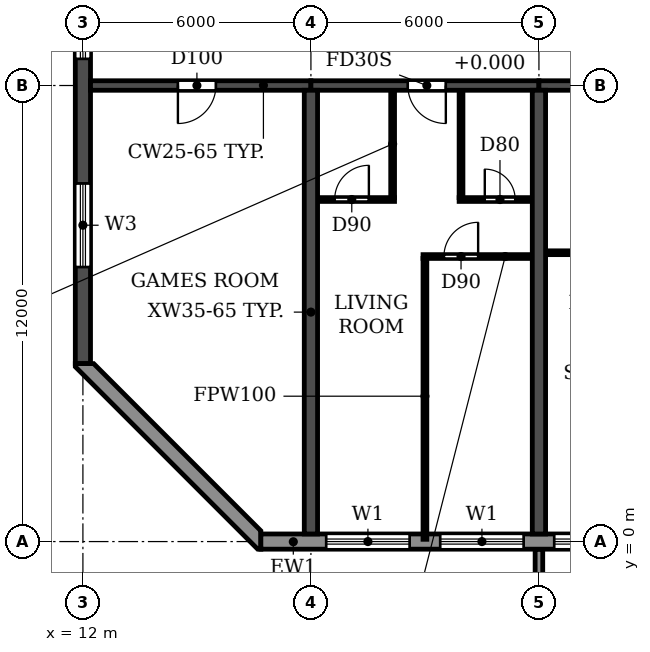
"""IFC4 building model, lengths in metres.
Left out: names, types, materials, properties, quantities, classifications, styles, units other than length and angle.
Written with IfcOpenShell. Run it as: python <this file> out.ifc"""

import sys

from ifc_helpers import new_model, si_unit, direction, frame, frame_2d, origin, place, context, subcontext, project, spatial, polyline, rectangle, outline, extrude, source, transform, mapped, element, fill, save


model = new_model("IFC4")
c1 = context("Model", 3, precision=1e-05, world=origin(), true_north=direction((0.0, 1.0)))
c2 = subcontext(c1, "Body", "Model", "MODEL_VIEW")
j1 = project(units=[si_unit("LENGTHUNIT", "METRE"), si_unit("PLANEANGLEUNIT", "RADIAN")], contexts=[c1])
p1 = place(None, origin())
s1 = spatial("IfcSite", under=j1, at=p1, CompositionType="ELEMENT")
p2 = place(p1, origin())
s2 = spatial("IfcBuilding", under=s1, at=p2, CompositionType="ELEMENT")
p3 = place(p2, frame((0.0, 0.0, 109.2)))
s3 = spatial("IfcBuildingStorey", under=s2, at=p3, CompositionType="ELEMENT", Elevation=109.2)
for number, where, z_axis, x_axis in (
    (1, (18.0, 0.2, 0.0), (0.0, 0.0, 1.0), (0.0, 1.0, 0.0)),
    (2, (24.0, 0.2, 0.0), (0.0, 0.0, 1.0), (0.0, 1.0, 0.0)),
):
    element("IfcWall", number, at=place(p3, frame(where, z_axis=z_axis, x_axis=x_axis)), inside=s3, PredefinedType="SHEAR", context=c2, shape_type="SweptSolid", body=[
        extrude(rectangle(XDim=11.675, YDim=0.35, at=frame_2d((5.837, 0.0))), origin(), (0.0, 0.0, 1.0), 3.06),
    ])
p4 = place(p3, frame((12.0, 4.683, 0.0), z_axis=(0.0, 0.0, 1.0), x_axis=(0.0, 1.0, 0.0)))
e3 = element("IfcWall", 3, at=p4, inside=s3, PredefinedType="SHEAR", context=c2, shape_type="SweptSolid", body=[
    extrude(rectangle(XDim=34.234, YDim=0.4, at=frame_2d((17.117, 0.0))), origin(), (0.0, 0.0, 1.0), 3.06),
])
p5 = place(p4, frame((23.817, 0.0, 0.9)))
e4 = element("IfcOpeningElement", 4, at=p5, cuts=e3, PredefinedType="OPENING", context=c2, shape_type="SweptSolid", body=[
    extrude(rectangle(XDim=1.2, YDim=1.5, at=frame_2d((0.6, 0.75))), frame((0.0, 0.21, 0.0), z_axis=(0.0, -1.0, 0.0), x_axis=(1.0, 0.0, 0.0)), (0.0, 0.0, 1.0), 0.42),
])
p6 = place(p4, frame((8.017, 0.0, 0.9)))
e5 = element("IfcOpeningElement", 5, at=p6, cuts=e3, PredefinedType="OPENING", context=c2, shape_type="SweptSolid", body=[
    extrude(rectangle(XDim=1.2, YDim=1.5, at=frame_2d((0.6, 0.75))), frame((0.0, 0.21, 0.0), z_axis=(0.0, -1.0, 0.0), x_axis=(1.0, 0.0, 0.0)), (0.0, 0.0, 1.0), 0.42),
])
p7 = place(p4, frame((15.917, 0.0, 0.9)))
e6 = element("IfcOpeningElement", 6, at=p7, cuts=e3, PredefinedType="OPENING", context=c2, shape_type="SweptSolid", body=[
    extrude(rectangle(XDim=1.2, YDim=1.5, at=frame_2d((0.6, 0.75))), frame((0.0, 0.21, 0.0), z_axis=(0.0, -1.0, 0.0), x_axis=(1.0, 0.0, 0.0)), (0.0, 0.0, 1.0), 0.42),
])
p8 = place(p4, frame((28.894, 0.0, 0.6)))
e7 = element("IfcOpeningElement", 7, at=p8, cuts=e3, PredefinedType="OPENING", context=c2, shape_type="SweptSolid", body=[
    extrude(rectangle(XDim=2.2, YDim=1.8, at=frame_2d((1.1, 0.9))), frame((0.0, 0.21, 0.0), z_axis=(0.0, -1.0, 0.0), x_axis=(1.0, 0.0, 0.0)), (0.0, 0.0, 1.0), 0.42),
])
p9 = place(p4, frame((2.541, 0.0, 0.6)))
e8 = element("IfcOpeningElement", 8, at=p9, cuts=e3, PredefinedType="OPENING", context=c2, shape_type="SweptSolid", body=[
    extrude(rectangle(XDim=2.2, YDim=1.8, at=frame_2d((1.1, 0.9))), frame((0.0, 0.21, 0.0), z_axis=(0.0, -1.0, 0.0), x_axis=(1.0, 0.0, 0.0)), (0.0, 0.0, 1.0), 0.42),
])
p10 = place(p3, frame((12.2, 12.0, 0.0), z_axis=(0.0, 0.0, 1.0), x_axis=(1.0, 0.0, 0.0)))
e9 = element("IfcWall", 9, at=p10, inside=s3, PredefinedType="SHEAR", context=c2, shape_type="SweptSolid", body=[
    extrude(rectangle(XDim=5.8, YDim=0.25, at=frame_2d((2.9, 0.0))), origin(), (0.0, 0.0, 1.0), 2.46),
])
p11 = place(p10, frame((2.3, 0.0, 0.0)))
e10 = element("IfcOpeningElement", 10, at=p11, cuts=e9, PredefinedType="OPENING", context=c2, shape_type="SweptSolid", body=[
    extrude(rectangle(XDim=1.0, YDim=2.1, at=frame_2d((0.5, 1.05))), frame((0.0, 0.135, 0.0), z_axis=(0.0, -1.0, 0.0), x_axis=(1.0, 0.0, 0.0)), (0.0, 0.0, 1.0), 0.27),
])
p12 = place(p3, frame((18.0, 12.0, 0.0), z_axis=(0.0, 0.0, 1.0), x_axis=(1.0, 0.0, 0.0)))
e11 = element("IfcWall", 11, at=p12, inside=s3, PredefinedType="SHEAR", context=c2, shape_type="SweptSolid", body=[
    extrude(rectangle(XDim=6.0, YDim=0.25, at=frame_2d((3.0, 0.0))), origin(), (0.0, 0.0, 1.0), 2.46),
])
p13 = place(p12, frame((2.55, 0.0, 0.0)))
e12 = element("IfcOpeningElement", 12, at=p13, cuts=e11, PredefinedType="OPENING", context=c2, shape_type="SweptSolid", body=[
    extrude(rectangle(XDim=1.0, YDim=2.1, at=frame_2d((0.5, 1.05))), frame((0.0, 0.135, 0.0), z_axis=(0.0, -1.0, 0.0), x_axis=(1.0, 0.0, 0.0)), (0.0, 0.0, 1.0), 0.27),
])
p14 = place(p3, frame((24.0, 12.0, 0.0), z_axis=(0.0, 0.0, 1.0), x_axis=(1.0, 0.0, 0.0)))
e13 = element("IfcWall", 13, at=p14, inside=s3, PredefinedType="SHEAR", context=c2, shape_type="SweptSolid", body=[
    extrude(rectangle(XDim=6.0, YDim=0.25, at=frame_2d((3.0, 0.0))), origin(), (0.0, 0.0, 1.0), 2.46),
])
p15 = place(p14, frame((2.45, 0.0, 0.0)))
e14 = element("IfcOpeningElement", 14, at=p15, cuts=e13, PredefinedType="OPENING", context=c2, shape_type="SweptSolid", body=[
    extrude(rectangle(XDim=1.0, YDim=2.1, at=frame_2d((0.5, 1.05))), frame((0.0, 0.135, 0.0), z_axis=(0.0, -1.0, 0.0), x_axis=(1.0, 0.0, 0.0)), (0.0, 0.0, 1.0), 0.27),
])
p16 = place(p3, frame((16.683, 0.0, 0.0), z_axis=(0.0, 0.0, 1.0), x_axis=(1.0, 0.0, 0.0)))
e15 = element("IfcWall", 15, at=p16, inside=s3, PredefinedType="STANDARD", context=c2, shape_type="SweptSolid", body=[
    extrude(rectangle(XDim=68.634, YDim=0.4, at=frame_2d((34.317, 0.0))), origin(), (0.0, 0.0, 1.0), 3.06),
])
p17 = place(p16, frame((1.717, 0.0, 0.9)))
e16 = element("IfcOpeningElement", 16, at=p17, cuts=e15, PredefinedType="OPENING", context=c2, shape_type="SweptSolid", body=[
    extrude(rectangle(XDim=2.2, YDim=1.5, at=frame_2d((1.1, 0.75))), frame((0.0, 0.21, 0.0), z_axis=(0.0, -1.0, 0.0), x_axis=(1.0, 0.0, 0.0)), (0.0, 0.0, 1.0), 0.42),
])
p18 = place(p16, frame((4.717, 0.0, 0.9)))
e17 = element("IfcOpeningElement", 17, at=p18, cuts=e15, PredefinedType="OPENING", context=c2, shape_type="SweptSolid", body=[
    extrude(rectangle(XDim=2.2, YDim=1.5, at=frame_2d((1.1, 0.75))), frame((0.0, 0.21, 0.0), z_axis=(0.0, -1.0, 0.0), x_axis=(1.0, 0.0, 0.0)), (0.0, 0.0, 1.0), 0.42),
])
p19 = place(p16, frame((7.717, 0.0, 0.9)))
e18 = element("IfcOpeningElement", 18, at=p19, cuts=e15, PredefinedType="OPENING", context=c2, shape_type="SweptSolid", body=[
    extrude(rectangle(XDim=2.2, YDim=1.5, at=frame_2d((1.1, 0.75))), frame((0.0, 0.21, 0.0), z_axis=(0.0, -1.0, 0.0), x_axis=(1.0, 0.0, 0.0)), (0.0, 0.0, 1.0), 0.42),
])
p20 = place(p16, frame((10.917, 0.0, 0.0)))
e19 = element("IfcOpeningElement", 19, at=p20, cuts=e15, PredefinedType="OPENING", context=c2, shape_type="SweptSolid", body=[
    extrude(rectangle(XDim=1.8, YDim=2.4, at=frame_2d((0.9, 1.2))), frame((0.0, 0.21, 0.0), z_axis=(0.0, -1.0, 0.0), x_axis=(1.0, 0.0, 0.0)), (0.0, 0.0, 1.0), 0.42),
])
p21 = place(p16, frame((13.717, 0.0, 0.9)))
e20 = element("IfcOpeningElement", 20, at=p21, cuts=e15, PredefinedType="OPENING", context=c2, shape_type="SweptSolid", body=[
    extrude(rectangle(XDim=2.2, YDim=1.5, at=frame_2d((1.1, 0.75))), frame((0.0, 0.21, 0.0), z_axis=(0.0, -1.0, 0.0), x_axis=(1.0, 0.0, 0.0)), (0.0, 0.0, 1.0), 0.42),
])
p22 = place(p16, frame((16.717, 0.0, 0.9)))
e21 = element("IfcOpeningElement", 21, at=p22, cuts=e15, PredefinedType="OPENING", context=c2, shape_type="SweptSolid", body=[
    extrude(rectangle(XDim=2.2, YDim=1.5, at=frame_2d((1.1, 0.75))), frame((0.0, 0.21, 0.0), z_axis=(0.0, -1.0, 0.0), x_axis=(1.0, 0.0, 0.0)), (0.0, 0.0, 1.0), 0.42),
])
p23 = place(p16, frame((19.717, 0.0, 0.9)))
e22 = element("IfcOpeningElement", 22, at=p23, cuts=e15, PredefinedType="OPENING", context=c2, shape_type="SweptSolid", body=[
    extrude(rectangle(XDim=2.2, YDim=1.5, at=frame_2d((1.1, 0.75))), frame((0.0, 0.21, 0.0), z_axis=(0.0, -1.0, 0.0), x_axis=(1.0, 0.0, 0.0)), (0.0, 0.0, 1.0), 0.42),
])
p24 = place(p16, frame((22.717, 0.0, 0.9)))
e23 = element("IfcOpeningElement", 23, at=p24, cuts=e15, PredefinedType="OPENING", context=c2, shape_type="SweptSolid", body=[
    extrude(rectangle(XDim=2.2, YDim=1.5, at=frame_2d((1.1, 0.75))), frame((0.0, 0.21, 0.0), z_axis=(0.0, -1.0, 0.0), x_axis=(1.0, 0.0, 0.0)), (0.0, 0.0, 1.0), 0.42),
])
p25 = place(p16, frame((25.717, 0.0, 0.9)))
e24 = element("IfcOpeningElement", 24, at=p25, cuts=e15, PredefinedType="OPENING", context=c2, shape_type="SweptSolid", body=[
    extrude(rectangle(XDim=2.2, YDim=1.5, at=frame_2d((1.1, 0.75))), frame((0.0, 0.21, 0.0), z_axis=(0.0, -1.0, 0.0), x_axis=(1.0, 0.0, 0.0)), (0.0, 0.0, 1.0), 0.42),
])
p26 = place(p16, frame((28.717, 0.0, 0.9)))
e25 = element("IfcOpeningElement", 25, at=p26, cuts=e15, PredefinedType="OPENING", context=c2, shape_type="SweptSolid", body=[
    extrude(rectangle(XDim=2.2, YDim=1.5, at=frame_2d((1.1, 0.75))), frame((0.0, 0.21, 0.0), z_axis=(0.0, -1.0, 0.0), x_axis=(1.0, 0.0, 0.0)), (0.0, 0.0, 1.0), 0.42),
])
p27 = place(p16, frame((31.917, 0.0, 0.0)))
e26 = element("IfcOpeningElement", 26, at=p27, cuts=e15, PredefinedType="OPENING", context=c2, shape_type="SweptSolid", body=[
    extrude(rectangle(XDim=1.8, YDim=2.4, at=frame_2d((0.9, 1.2))), frame((0.0, 0.21, 0.0), z_axis=(0.0, -1.0, 0.0), x_axis=(1.0, 0.0, 0.0)), (0.0, 0.0, 1.0), 0.42),
])
p28 = place(p16, frame((34.717, 0.0, 0.9)))
e27 = element("IfcOpeningElement", 27, at=p28, cuts=e15, PredefinedType="OPENING", context=c2, shape_type="SweptSolid", body=[
    extrude(rectangle(XDim=2.2, YDim=1.5, at=frame_2d((1.1, 0.75))), frame((0.0, 0.21, 0.0), z_axis=(0.0, -1.0, 0.0), x_axis=(1.0, 0.0, 0.0)), (0.0, 0.0, 1.0), 0.42),
])
p29 = place(p16, frame((37.717, 0.0, 0.9)))
e28 = element("IfcOpeningElement", 28, at=p29, cuts=e15, PredefinedType="OPENING", context=c2, shape_type="SweptSolid", body=[
    extrude(rectangle(XDim=2.2, YDim=1.5, at=frame_2d((1.1, 0.75))), frame((0.0, 0.21, 0.0), z_axis=(0.0, -1.0, 0.0), x_axis=(1.0, 0.0, 0.0)), (0.0, 0.0, 1.0), 0.42),
])
p30 = place(p16, frame((40.717, 0.0, 0.9)))
e29 = element("IfcOpeningElement", 29, at=p30, cuts=e15, PredefinedType="OPENING", context=c2, shape_type="SweptSolid", body=[
    extrude(rectangle(XDim=2.2, YDim=1.5, at=frame_2d((1.1, 0.75))), frame((0.0, 0.21, 0.0), z_axis=(0.0, -1.0, 0.0), x_axis=(1.0, 0.0, 0.0)), (0.0, 0.0, 1.0), 0.42),
])
p31 = place(p16, frame((43.717, 0.0, 0.9)))
e30 = element("IfcOpeningElement", 30, at=p31, cuts=e15, PredefinedType="OPENING", context=c2, shape_type="SweptSolid", body=[
    extrude(rectangle(XDim=2.2, YDim=1.5, at=frame_2d((1.1, 0.75))), frame((0.0, 0.21, 0.0), z_axis=(0.0, -1.0, 0.0), x_axis=(1.0, 0.0, 0.0)), (0.0, 0.0, 1.0), 0.42),
])
p32 = place(p16, frame((46.917, 0.0, 0.0)))
e31 = element("IfcOpeningElement", 31, at=p32, cuts=e15, PredefinedType="OPENING", context=c2, shape_type="SweptSolid", body=[
    extrude(rectangle(XDim=1.8, YDim=2.4, at=frame_2d((0.9, 1.2))), frame((0.0, 0.21, 0.0), z_axis=(0.0, -1.0, 0.0), x_axis=(1.0, 0.0, 0.0)), (0.0, 0.0, 1.0), 0.42),
])
p33 = place(p16, frame((49.717, 0.0, 0.9)))
e32 = element("IfcOpeningElement", 32, at=p33, cuts=e15, PredefinedType="OPENING", context=c2, shape_type="SweptSolid", body=[
    extrude(rectangle(XDim=2.2, YDim=1.5, at=frame_2d((1.1, 0.75))), frame((0.0, 0.21, 0.0), z_axis=(0.0, -1.0, 0.0), x_axis=(1.0, 0.0, 0.0)), (0.0, 0.0, 1.0), 0.42),
])
p34 = place(p16, frame((52.717, 0.0, 0.9)))
e33 = element("IfcOpeningElement", 33, at=p34, cuts=e15, PredefinedType="OPENING", context=c2, shape_type="SweptSolid", body=[
    extrude(rectangle(XDim=2.2, YDim=1.5, at=frame_2d((1.1, 0.75))), frame((0.0, 0.21, 0.0), z_axis=(0.0, -1.0, 0.0), x_axis=(1.0, 0.0, 0.0)), (0.0, 0.0, 1.0), 0.42),
])
p35 = place(p16, frame((55.717, 0.0, 0.9)))
e34 = element("IfcOpeningElement", 34, at=p35, cuts=e15, PredefinedType="OPENING", context=c2, shape_type="SweptSolid", body=[
    extrude(rectangle(XDim=2.2, YDim=1.5, at=frame_2d((1.1, 0.75))), frame((0.0, 0.21, 0.0), z_axis=(0.0, -1.0, 0.0), x_axis=(1.0, 0.0, 0.0)), (0.0, 0.0, 1.0), 0.42),
])
p36 = place(p16, frame((58.717, 0.0, 0.9)))
e35 = element("IfcOpeningElement", 35, at=p36, cuts=e15, PredefinedType="OPENING", context=c2, shape_type="SweptSolid", body=[
    extrude(rectangle(XDim=2.2, YDim=1.5, at=frame_2d((1.1, 0.75))), frame((0.0, 0.21, 0.0), z_axis=(0.0, -1.0, 0.0), x_axis=(1.0, 0.0, 0.0)), (0.0, 0.0, 1.0), 0.42),
])
p37 = place(p16, frame((61.717, 0.0, 0.9)))
e36 = element("IfcOpeningElement", 36, at=p37, cuts=e15, PredefinedType="OPENING", context=c2, shape_type="SweptSolid", body=[
    extrude(rectangle(XDim=2.2, YDim=1.5, at=frame_2d((1.1, 0.75))), frame((0.0, 0.21, 0.0), z_axis=(0.0, -1.0, 0.0), x_axis=(1.0, 0.0, 0.0)), (0.0, 0.0, 1.0), 0.42),
])
p38 = place(p16, frame((64.717, 0.0, 0.9)))
e37 = element("IfcOpeningElement", 37, at=p38, cuts=e15, PredefinedType="OPENING", context=c2, shape_type="SweptSolid", body=[
    extrude(rectangle(XDim=2.2, YDim=1.5, at=frame_2d((1.1, 0.75))), frame((0.0, 0.21, 0.0), z_axis=(0.0, -1.0, 0.0), x_axis=(1.0, 0.0, 0.0)), (0.0, 0.0, 1.0), 0.42),
])
p39 = place(p3, origin())
e38 = element("IfcWall", 38, at=p39, inside=s3, PredefinedType="STANDARD", context=c2, shape_type="SweptSolid", body=[
    extrude(outline(polyline([(11.8, 4.683), (11.8, 4.6), (16.6, -0.2), (16.683, -0.2), (16.683, 0.283), (12.283, 4.683), (11.8, 4.683)])), origin(), (0.0, 0.0, 1.0), 3.06),
])
m1 = source(origin(), c2, "Body", "SweptSolid", [
    extrude(outline(polyline([(0.0, 0.0), (0.2, 0.0), (0.2, 1.65), (0.0, 1.65), (0.0, 0.0)])), origin(), (0.0, 0.0, 1.0), 3.1),
])
p40 = place(p3, frame((23.9, -1.85, 0.0)))
e39 = element("IfcWall", 39, at=p40, inside=s3, PredefinedType="STANDARD", context=c2, shape_type="MappedRepresentation", body=[
    mapped(m1, transform((0.0, 0.0, 0.0))),
])
p41 = place(p3, frame((20.95, 7.5, 0.0), z_axis=(0.0, 0.0, 1.0), x_axis=(1.0, 0.0, 0.0)))
e40 = element("IfcWall", 40, at=p41, inside=s3, PredefinedType="PARTITIONING", context=c2, shape_type="SweptSolid", body=[
    extrude(rectangle(XDim=2.865, YDim=0.1, at=frame_2d((1.433, 0.0))), origin(), (0.0, 0.0, 1.0), 3.06),
])
p42 = place(p41, frame((0.55, 0.0, 0.0)))
e41 = element("IfcOpeningElement", 41, at=p42, cuts=e40, PredefinedType="OPENING", context=c2, shape_type="SweptSolid", body=[
    extrude(rectangle(XDim=0.9, YDim=2.1, at=frame_2d((0.45, 1.05))), frame((0.0, 0.06, 0.0), z_axis=(0.0, -1.0, 0.0), x_axis=(1.0, 0.0, 0.0)), (0.0, 0.0, 1.0), 0.12),
])
p43 = place(p3, frame((24.185, 7.6, 0.0), z_axis=(0.0, 0.0, 1.0), x_axis=(1.0, 0.0, 0.0)))
e42 = element("IfcWall", 42, at=p43, inside=s3, PredefinedType="PARTITIONING", context=c2, shape_type="SweptSolid", body=[
    extrude(rectangle(XDim=1.915, YDim=0.1, at=frame_2d((0.958, 0.0))), origin(), (0.0, 0.0, 1.0), 3.06),
])
p44 = place(p3, frame((18.185, 9.0, 0.0), z_axis=(0.0, 0.0, 1.0), x_axis=(1.0, 0.0, 0.0)))
e43 = element("IfcWall", 43, at=p44, inside=s3, PredefinedType="PARTITIONING", context=c2, shape_type="SweptSolid", body=[
    extrude(rectangle(XDim=2.015, YDim=0.1, at=frame_2d((1.007, 0.0))), origin(), (0.0, 0.0, 1.0), 3.06),
])
p45 = place(p44, frame((0.44, 0.0, 0.0)))
e44 = element("IfcOpeningElement", 44, at=p45, cuts=e43, PredefinedType="OPENING", context=c2, shape_type="SweptSolid", body=[
    extrude(rectangle(XDim=0.9, YDim=2.1, at=frame_2d((0.45, 1.05))), frame((0.0, 0.06, 0.0), z_axis=(0.0, -1.0, 0.0), x_axis=(1.0, 0.0, 0.0)), (0.0, 0.0, 1.0), 0.12),
])
p46 = place(p3, frame((21.9, 9.0, 0.0), z_axis=(0.0, 0.0, 1.0), x_axis=(1.0, 0.0, 0.0)))
e45 = element("IfcWall", 45, at=p46, inside=s3, PredefinedType="PARTITIONING", context=c2, shape_type="SweptSolid", body=[
    extrude(rectangle(XDim=1.915, YDim=0.1, at=frame_2d((0.958, 0.0))), origin(), (0.0, 0.0, 1.0), 3.06),
])
p47 = place(p46, frame((0.675, 0.0, 0.0)))
e46 = element("IfcOpeningElement", 46, at=p47, cuts=e45, PredefinedType="OPENING", context=c2, shape_type="SweptSolid", body=[
    extrude(rectangle(XDim=0.8, YDim=2.1, at=frame_2d((0.4, 1.05))), frame((0.0, 0.06, 0.0), z_axis=(0.0, -1.0, 0.0), x_axis=(1.0, 0.0, 0.0)), (0.0, 0.0, 1.0), 0.12),
])
p48 = place(p3, frame((20.15, 9.05, 0.0), z_axis=(0.0, 0.0, 1.0), x_axis=(0.0, 1.0, 0.0)))
e47 = element("IfcWall", 47, at=p48, inside=s3, PredefinedType="PARTITIONING", context=c2, shape_type="SweptSolid", body=[
    extrude(rectangle(XDim=2.815, YDim=0.1, at=frame_2d((1.407, 0.0))), origin(), (0.0, 0.0, 1.0), 3.06),
])
p49 = place(p3, frame((21.0, 0.06, 0.0), z_axis=(0.0, 0.0, 1.0), x_axis=(0.0, 1.0, 0.0)))
e48 = element("IfcWall", 48, at=p49, inside=s3, PredefinedType="PARTITIONING", context=c2, shape_type="SweptSolid", body=[
    extrude(rectangle(XDim=7.39, YDim=0.1, at=frame_2d((3.695, 0.0))), origin(), (0.0, 0.0, 1.0), 3.06),
])
p50 = place(p3, frame((21.95, 9.05, 0.0), z_axis=(0.0, 0.0, 1.0), x_axis=(0.0, 1.0, 0.0)))
e49 = element("IfcWall", 49, at=p50, inside=s3, PredefinedType="PARTITIONING", context=c2, shape_type="SweptSolid", body=[
    extrude(rectangle(XDim=2.815, YDim=0.1, at=frame_2d((1.407, 0.0))), origin(), (0.0, 0.0, 1.0), 3.06),
])
p51 = place(p17, origin())
e50 = element("IfcWindow", 50, at=p51, inside=s3, PartitioningType="DOUBLE_PANEL_HORIZONTAL", PredefinedType="WINDOW", context=c2, shape_type="SweptSolid", body=[
    extrude(rectangle(XDim=2.2, YDim=1.5, at=frame_2d((1.1, 0.75))), frame((0.0, 0.03, 0.0), z_axis=(0.0, -1.0, 0.0), x_axis=(1.0, 0.0, 0.0)), (0.0, 0.0, 1.0), 0.06),
])
fill(e16, e50)
p52 = place(p18, origin())
e51 = element("IfcWindow", 51, at=p52, inside=s3, PartitioningType="DOUBLE_PANEL_HORIZONTAL", PredefinedType="WINDOW", context=c2, shape_type="SweptSolid", body=[
    extrude(rectangle(XDim=2.2, YDim=1.5, at=frame_2d((1.1, 0.75))), frame((0.0, 0.03, 0.0), z_axis=(0.0, -1.0, 0.0), x_axis=(1.0, 0.0, 0.0)), (0.0, 0.0, 1.0), 0.06),
])
fill(e17, e51)
p53 = place(p19, origin())
e52 = element("IfcWindow", 52, at=p53, inside=s3, PartitioningType="DOUBLE_PANEL_HORIZONTAL", PredefinedType="WINDOW", context=c2, shape_type="SweptSolid", body=[
    extrude(rectangle(XDim=2.2, YDim=1.5, at=frame_2d((1.1, 0.75))), frame((0.0, 0.03, 0.0), z_axis=(0.0, -1.0, 0.0), x_axis=(1.0, 0.0, 0.0)), (0.0, 0.0, 1.0), 0.06),
])
fill(e18, e52)
p54 = place(p6, origin())
e53 = element("IfcWindow", 53, at=p54, inside=s3, PartitioningType="SINGLE_PANEL", PredefinedType="WINDOW", context=c2, shape_type="SweptSolid", body=[
    extrude(rectangle(XDim=1.2, YDim=1.5, at=frame_2d((0.6, 0.75))), frame((0.0, 0.03, 0.0), z_axis=(0.0, -1.0, 0.0), x_axis=(1.0, 0.0, 0.0)), (0.0, 0.0, 1.0), 0.06),
])
fill(e5, e53)
p55 = place(p9, origin())
e54 = element("IfcWindow", 54, at=p55, inside=s3, PartitioningType="DOUBLE_PANEL_HORIZONTAL", PredefinedType="WINDOW", context=c2, shape_type="SweptSolid", body=[
    extrude(rectangle(XDim=2.2, YDim=1.8, at=frame_2d((1.1, 0.9))), frame((0.0, 0.03, 0.0), z_axis=(0.0, -1.0, 0.0), x_axis=(1.0, 0.0, 0.0)), (0.0, 0.0, 1.0), 0.06),
])
fill(e8, e54)
p56 = place(p11, frame((1.0, 0.0, 0.0), z_axis=(0.0, 0.0, 1.0), x_axis=(-1.0, 0.0, 0.0)))
e55 = element("IfcDoor", 55, at=p56, inside=s3, OperationType="SINGLE_SWING_RIGHT", PredefinedType="DOOR", context=c2, shape_type="SweptSolid", body=[
    extrude(rectangle(XDim=1.0, YDim=2.1, at=frame_2d((0.5, 1.05))), frame((0.0, 0.025, 0.0), z_axis=(0.0, -1.0, 0.0), x_axis=(1.0, 0.0, 0.0)), (0.0, 0.0, 1.0), 0.05),
])
fill(e10, e55)
p57 = place(p45, origin())
e56 = element("IfcDoor", 56, at=p57, inside=s3, OperationType="SINGLE_SWING_RIGHT", PredefinedType="DOOR", context=c2, shape_type="SweptSolid", body=[
    extrude(rectangle(XDim=0.9, YDim=2.1, at=frame_2d((0.45, 1.05))), frame((0.0, 0.025, 0.0), z_axis=(0.0, -1.0, 0.0), x_axis=(1.0, 0.0, 0.0)), (0.0, 0.0, 1.0), 0.05),
])
fill(e44, e56)
p58 = place(p13, frame((1.0, 0.0, 0.0), z_axis=(0.0, 0.0, 1.0), x_axis=(-1.0, 0.0, 0.0)))
e57 = element("IfcDoor", 57, at=p58, inside=s3, OperationType="SINGLE_SWING_LEFT", PredefinedType="DOOR", context=c2, shape_type="SweptSolid", body=[
    extrude(rectangle(XDim=1.0, YDim=2.1, at=frame_2d((0.5, 1.05))), frame((0.0, 0.025, 0.0), z_axis=(0.0, -1.0, 0.0), x_axis=(1.0, 0.0, 0.0)), (0.0, 0.0, 1.0), 0.05),
])
fill(e12, e57)
p59 = place(p42, origin())
e58 = element("IfcDoor", 58, at=p59, inside=s3, OperationType="SINGLE_SWING_RIGHT", PredefinedType="DOOR", context=c2, shape_type="SweptSolid", body=[
    extrude(rectangle(XDim=0.9, YDim=2.1, at=frame_2d((0.45, 1.05))), frame((0.0, 0.025, 0.0), z_axis=(0.0, -1.0, 0.0), x_axis=(1.0, 0.0, 0.0)), (0.0, 0.0, 1.0), 0.05),
])
fill(e41, e58)
p60 = place(p47, origin())
e59 = element("IfcDoor", 59, at=p60, inside=s3, OperationType="SINGLE_SWING_LEFT", PredefinedType="DOOR", context=c2, shape_type="SweptSolid", body=[
    extrude(rectangle(XDim=0.8, YDim=2.1, at=frame_2d((0.4, 1.05))), frame((0.0, 0.025, 0.0), z_axis=(0.0, -1.0, 0.0), x_axis=(1.0, 0.0, 0.0)), (0.0, 0.0, 1.0), 0.05),
])
fill(e46, e59)
save(model, sys.argv[1])
